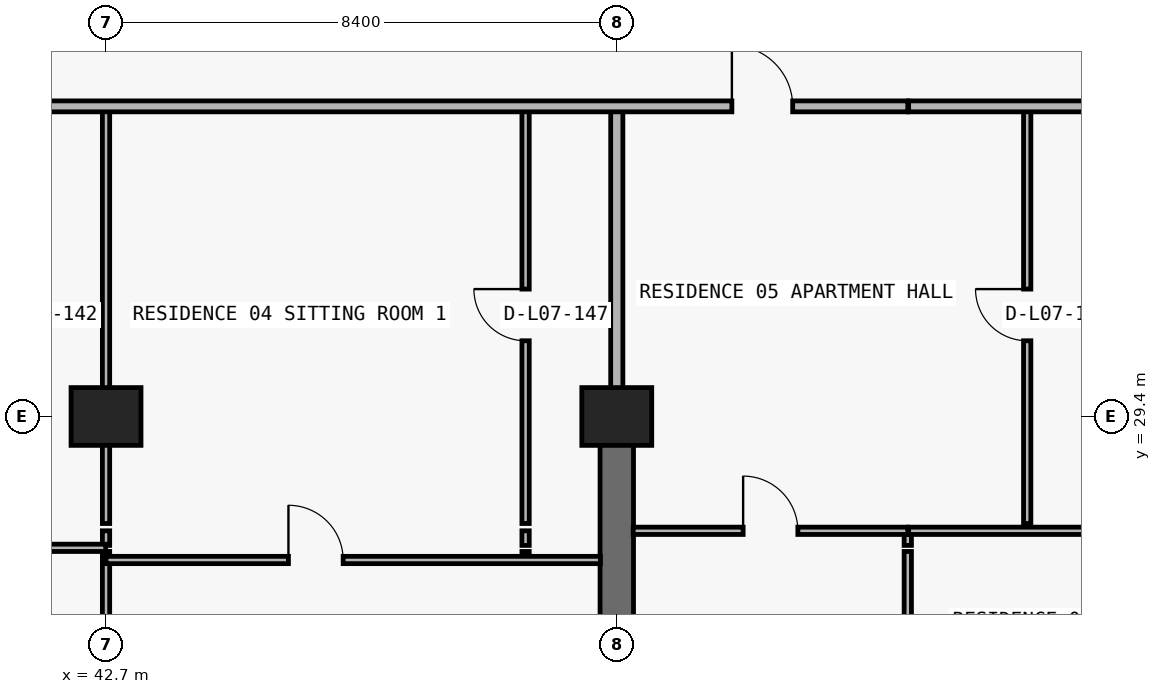
"""IFC4 building model, lengths in metres.
Left out: names, types, materials, properties, quantities, classifications, styles, units other than length and angle.
Written with IfcOpenShell. Run it as: python <this file> out.ifc"""

import sys

from ifc_helpers import new_model, si_unit, direction, frame, frame_2d, origin, origin_2d, place, context, subcontext, project, spatial, rectangle, extrude, element, fill, save


model = new_model("IFC4")
c1 = context("Model", 3, precision=1e-05, world=origin(), true_north=direction((0.0, 1.0)))
c2 = subcontext(c1, "Body", "Model", "MODEL_VIEW")
j1 = project(units=[si_unit("LENGTHUNIT", "METRE"), si_unit("PLANEANGLEUNIT", "RADIAN")], contexts=[c1])
p1 = place(None, origin())
s1 = spatial("IfcSite", under=j1, at=p1, CompositionType="ELEMENT")
p2 = place(p1, origin())
s2 = spatial("IfcBuilding", under=s1, at=p2, CompositionType="ELEMENT")
p3 = place(p2, frame((0.0, 0.0, 33.3)))
s3 = spatial("IfcBuildingStorey", under=s2, at=p3, CompositionType="ELEMENT", Elevation=33.3)
for number, where, z_axis, x_axis in (
    (1, (42.7, 29.4, 0.0), (0.0, 0.0, 1.0), (1.0, 0.0, 0.0)),
    (2, (51.1, 29.4, 0.0), (0.0, 0.0, 1.0), (1.0, 0.0, 0.0)),
):
    element("IfcColumn", number, at=place(p3, frame(where, z_axis=z_axis, x_axis=x_axis)), inside=s3, PredefinedType="COLUMN", context=c2, shape_type="SweptSolid", body=[
        extrude(rectangle(XDim=1.15, YDim=0.95, at=origin_2d()), origin(), (0.0, 0.0, 1.0), 3.05),
    ])
p4 = place(p3, frame((51.1, 20.8, 0.0), z_axis=(0.0, 0.0, 1.0), x_axis=(0.0, 1.0, 0.0)))
e3 = element("IfcWall", 3, at=p4, inside=s3, PredefinedType="SHEAR", context=c2, shape_type="SweptSolid", body=[
    extrude(rectangle(XDim=8.6, YDim=0.55, at=frame_2d((4.3, 0.0))), origin(), (0.0, 0.0, 1.0), 3.05),
])
p5 = place(p3, frame((42.7, 22.49, 0.0), z_axis=(0.0, 0.0, 1.0), x_axis=(0.0, 1.0, 0.0)))
e4 = element("IfcWall", 4, at=p5, inside=s3, PredefinedType="PARTITIONING", context=c2, shape_type="SweptSolid", body=[
    extrude(rectangle(XDim=4.69, YDim=0.12, at=frame_2d((2.345, 0.0))), origin(), (0.0, 0.0, 1.0), 2.11),
])
p6 = place(p5, frame((1.9, 0.0, 0.0)))
e5 = element("IfcOpeningElement", 5, at=p6, cuts=e4, PredefinedType="OPENING", context=c2, shape_type="SweptSolid", body=[
    extrude(rectangle(XDim=0.9, YDim=2.06, at=frame_2d((0.45, 1.03))), frame((0.0, 0.07, 0.0), z_axis=(0.0, -1.0, 0.0), x_axis=(1.0, 0.0, 0.0)), (0.0, 0.0, 1.0), 0.14),
])
p7 = place(p3, frame((42.7, 27.28, 0.0), z_axis=(0.0, 0.0, 1.0), x_axis=(0.0, 1.0, 0.0)))
e6 = element("IfcWall", 6, at=p7, inside=s3, PredefinedType="PARTITIONING", context=c2, shape_type="SweptSolid", body=[
    extrude(rectangle(XDim=0.24, YDim=0.12, at=frame_2d((0.12, 0.0))), origin(), (0.0, 0.0, 1.0), 2.11),
])
p8 = place(p3, frame((42.7, 27.64, 0.0), z_axis=(0.0, 0.0, 1.0), x_axis=(0.0, 1.0, 0.0)))
e7 = element("IfcWall", 7, at=p8, inside=s3, PredefinedType="PARTITIONING", context=c2, shape_type="SweptSolid", body=[
    extrude(rectangle(XDim=6.86, YDim=0.12, at=frame_2d((3.43, 0.0))), origin(), (0.0, 0.0, 1.0), 2.11),
])
p9 = place(p3, frame((49.6, 27.04, 0.0), z_axis=(0.0, 0.0, 1.0), x_axis=(0.0, 1.0, 0.0)))
e8 = element("IfcWall", 8, at=p9, inside=s3, PredefinedType="PARTITIONING", context=c2, shape_type="SweptSolid", body=[
    extrude(rectangle(XDim=0.14, YDim=0.12, at=frame_2d((0.07, 0.0))), origin(), (0.0, 0.0, 1.0), 3.05),
])
p10 = place(p3, frame((49.6, 27.28, 0.0), z_axis=(0.0, 0.0, 1.0), x_axis=(0.0, 1.0, 0.0)))
e9 = element("IfcWall", 9, at=p10, inside=s3, PredefinedType="PARTITIONING", context=c2, shape_type="SweptSolid", body=[
    extrude(rectangle(XDim=0.24, YDim=0.12, at=frame_2d((0.12, 0.0))), origin(), (0.0, 0.0, 1.0), 3.05),
])
p11 = place(p3, frame((49.6, 27.64, 0.0), z_axis=(0.0, 0.0, 1.0), x_axis=(0.0, 1.0, 0.0)))
e10 = element("IfcWall", 10, at=p11, inside=s3, PredefinedType="PARTITIONING", context=c2, shape_type="SweptSolid", body=[
    extrude(rectangle(XDim=6.86, YDim=0.12, at=frame_2d((3.43, 0.0))), origin(), (0.0, 0.0, 1.0), 3.05),
])
p12 = place(p11, frame((3.005, 0.0, 0.0)))
e11 = element("IfcOpeningElement", 11, at=p12, cuts=e10, PredefinedType="OPENING", context=c2, shape_type="SweptSolid", body=[
    extrude(rectangle(XDim=0.85, YDim=2.1, at=frame_2d((0.425, 1.05))), frame((0.0, 0.07, 0.0), z_axis=(0.0, -1.0, 0.0), x_axis=(1.0, 0.0, 0.0)), (0.0, 0.0, 1.0), 0.14),
])
p13 = place(p3, frame((51.1, 29.405, 0.0), z_axis=(0.0, 0.0, 1.0), x_axis=(0.0, 1.0, 0.0)))
e12 = element("IfcWall", 12, at=p13, inside=s3, PredefinedType="PARTITIONING", context=c2, shape_type="SweptSolid", body=[
    extrude(rectangle(XDim=5.095, YDim=0.2, at=frame_2d((2.547, 0.0))), origin(), (0.0, 0.0, 1.0), 2.335),
])
p14 = place(p3, frame((55.886, 22.49, 0.0), z_axis=(0.0, 0.0, 1.0), x_axis=(0.0, 1.0, 0.0)))
e13 = element("IfcWall", 13, at=p14, inside=s3, PredefinedType="PARTITIONING", context=c2, shape_type="SweptSolid", body=[
    extrude(rectangle(XDim=4.69, YDim=0.12, at=frame_2d((2.345, 0.0))), origin(), (0.0, 0.0, 1.0), 3.05),
])
p15 = place(p14, frame((1.895, 0.0, 0.0)))
e14 = element("IfcOpeningElement", 14, at=p15, cuts=e13, PredefinedType="OPENING", context=c2, shape_type="SweptSolid", body=[
    extrude(rectangle(XDim=0.9, YDim=2.15, at=frame_2d((0.45, 1.075))), frame((0.0, 0.07, 0.0), z_axis=(0.0, -1.0, 0.0), x_axis=(1.0, 0.0, 0.0)), (0.0, 0.0, 1.0), 0.14),
])
p16 = place(p3, frame((55.886, 27.28, 0.0), z_axis=(0.0, 0.0, 1.0), x_axis=(0.0, 1.0, 0.0)))
e15 = element("IfcWall", 15, at=p16, inside=s3, PredefinedType="PARTITIONING", context=c2, shape_type="SweptSolid", body=[
    extrude(rectangle(XDim=0.24, YDim=0.12, at=frame_2d((0.12, 0.0))), origin(), (0.0, 0.0, 1.0), 3.05),
])
p17 = place(p3, frame((57.85, 27.64, 0.0), z_axis=(0.0, 0.0, 1.0), x_axis=(0.0, 1.0, 0.0)))
e16 = element("IfcWall", 16, at=p17, inside=s3, PredefinedType="PARTITIONING", context=c2, shape_type="SweptSolid", body=[
    extrude(rectangle(XDim=6.86, YDim=0.12, at=frame_2d((3.43, 0.0))), origin(), (0.0, 0.0, 1.0), 3.05),
])
p18 = place(p17, frame((3.005, 0.0, 0.0)))
e17 = element("IfcOpeningElement", 17, at=p18, cuts=e16, PredefinedType="OPENING", context=c2, shape_type="SweptSolid", body=[
    extrude(rectangle(XDim=0.85, YDim=2.1, at=frame_2d((0.425, 1.05))), frame((0.0, 0.07, 0.0), z_axis=(0.0, -1.0, 0.0), x_axis=(1.0, 0.0, 0.0)), (0.0, 0.0, 1.0), 0.14),
])
p19 = place(p3, frame((42.7, 27.04, 0.0), z_axis=(0.0, 0.0, 1.0), x_axis=(1.0, 0.0, 0.0)))
e18 = element("IfcWall", 18, at=p19, inside=s3, PredefinedType="PARTITIONING", context=c2, shape_type="SweptSolid", body=[
    extrude(rectangle(XDim=8.13, YDim=0.12, at=frame_2d((4.065, 0.0))), origin(), (0.0, 0.0, 1.0), 3.05),
])
p20 = place(p19, frame((3.0, 0.0, 0.0)))
e19 = element("IfcOpeningElement", 19, at=p20, cuts=e18, PredefinedType="OPENING", context=c2, shape_type="SweptSolid", body=[
    extrude(rectangle(XDim=0.9, YDim=2.15, at=frame_2d((0.45, 1.075))), frame((0.0, 0.07, 0.0), z_axis=(0.0, -1.0, 0.0), x_axis=(1.0, 0.0, 0.0)), (0.0, 0.0, 1.0), 0.14),
])
p21 = place(p3, frame((35.1, 27.24, 0.0), z_axis=(0.0, 0.0, 1.0), x_axis=(1.0, 0.0, 0.0)))
e20 = element("IfcWall", 20, at=p21, inside=s3, PredefinedType="PARTITIONING", context=c2, shape_type="SweptSolid", body=[
    extrude(rectangle(XDim=7.595, YDim=0.12, at=frame_2d((3.797, 0.0))), origin(), (0.0, 0.0, 1.0), 3.05),
])
p22 = place(p21, frame((2.6, 0.0, 0.0)))
e21 = element("IfcOpeningElement", 21, at=p22, cuts=e20, PredefinedType="OPENING", context=c2, shape_type="SweptSolid", body=[
    extrude(rectangle(XDim=0.9, YDim=2.15, at=frame_2d((0.45, 1.075))), frame((0.0, 0.07, 0.0), z_axis=(0.0, -1.0, 0.0), x_axis=(1.0, 0.0, 0.0)), (0.0, 0.0, 1.0), 0.14),
])
p23 = place(p3, frame((51.37, 27.52, 0.0), z_axis=(0.0, 0.0, 1.0), x_axis=(1.0, 0.0, 0.0)))
e22 = element("IfcWall", 22, at=p23, inside=s3, PredefinedType="PARTITIONING", context=c2, shape_type="SweptSolid", body=[
    extrude(rectangle(XDim=4.516, YDim=0.12, at=frame_2d((2.258, 0.0))), origin(), (0.0, 0.0, 1.0), 3.05),
])
p24 = place(p23, frame((1.808, 0.0, 0.0)))
e23 = element("IfcOpeningElement", 23, at=p24, cuts=e22, PredefinedType="OPENING", context=c2, shape_type="SweptSolid", body=[
    extrude(rectangle(XDim=0.9, YDim=2.15, at=frame_2d((0.45, 1.075))), frame((0.0, 0.07, 0.0), z_axis=(0.0, -1.0, 0.0), x_axis=(1.0, 0.0, 0.0)), (0.0, 0.0, 1.0), 0.14),
])
p25 = place(p3, frame((55.9, 27.52, 0.0), z_axis=(0.0, 0.0, 1.0), x_axis=(1.0, 0.0, 0.0)))
e24 = element("IfcWall", 24, at=p25, inside=s3, PredefinedType="PARTITIONING", context=c2, shape_type="SweptSolid", body=[
    extrude(rectangle(XDim=3.6, YDim=0.12, at=frame_2d((1.8, 0.0))), origin(), (0.0, 0.0, 1.0), 3.05),
])
p26 = place(p3, frame((5.105, 34.5, 0.0), z_axis=(0.0, 0.0, 1.0), x_axis=(1.0, 0.0, 0.0)))
e25 = element("IfcWall", 25, at=p26, inside=s3, PredefinedType="PARTITIONING", context=c2, shape_type="SweptSolid", body=[
    extrude(rectangle(XDim=50.781, YDim=0.18, at=frame_2d((25.391, 0.0))), origin(), (0.0, 0.0, 1.0), 3.05),
])
p27 = place(p26, frame((7.67, 0.0, 0.0)))
e26 = element("IfcOpeningElement", 26, at=p27, cuts=e25, PredefinedType="OPENING", context=c2, shape_type="SweptSolid", body=[
    extrude(rectangle(XDim=1.0, YDim=2.2, at=frame_2d((0.5, 1.1))), frame((0.0, 0.1, 0.0), z_axis=(0.0, -1.0, 0.0), x_axis=(1.0, 0.0, 0.0)), (0.0, 0.0, 1.0), 0.2),
])
p28 = place(p26, frame((16.07, 0.0, 0.0)))
e27 = element("IfcOpeningElement", 27, at=p28, cuts=e25, PredefinedType="OPENING", context=c2, shape_type="SweptSolid", body=[
    extrude(rectangle(XDim=1.0, YDim=2.2, at=frame_2d((0.5, 1.1))), frame((0.0, 0.1, 0.0), z_axis=(0.0, -1.0, 0.0), x_axis=(1.0, 0.0, 0.0)), (0.0, 0.0, 1.0), 0.2),
])
p29 = place(p26, frame((24.47, 0.0, 0.0)))
e28 = element("IfcOpeningElement", 28, at=p29, cuts=e25, PredefinedType="OPENING", context=c2, shape_type="SweptSolid", body=[
    extrude(rectangle(XDim=1.0, YDim=2.2, at=frame_2d((0.5, 1.1))), frame((0.0, 0.1, 0.0), z_axis=(0.0, -1.0, 0.0), x_axis=(1.0, 0.0, 0.0)), (0.0, 0.0, 1.0), 0.2),
])
p30 = place(p26, frame((32.545, 0.0, 0.0)))
e29 = element("IfcOpeningElement", 29, at=p30, cuts=e25, PredefinedType="OPENING", context=c2, shape_type="SweptSolid", body=[
    extrude(rectangle(XDim=1.0, YDim=2.2, at=frame_2d((0.5, 1.1))), frame((0.0, 0.1, 0.0), z_axis=(0.0, -1.0, 0.0), x_axis=(1.0, 0.0, 0.0)), (0.0, 0.0, 1.0), 0.2),
])
p31 = place(p26, frame((47.888, 0.0, 0.0)))
e30 = element("IfcOpeningElement", 30, at=p31, cuts=e25, PredefinedType="OPENING", context=c2, shape_type="SweptSolid", body=[
    extrude(rectangle(XDim=1.0, YDim=2.2, at=frame_2d((0.5, 1.1))), frame((0.0, 0.1, 0.0), z_axis=(0.0, -1.0, 0.0), x_axis=(1.0, 0.0, 0.0)), (0.0, 0.0, 1.0), 0.2),
])
p32 = place(p3, frame((55.9, 34.5, 0.0), z_axis=(0.0, 0.0, 1.0), x_axis=(1.0, 0.0, 0.0)))
e31 = element("IfcWall", 31, at=p32, inside=s3, PredefinedType="PARTITIONING", context=c2, shape_type="SweptSolid", body=[
    extrude(rectangle(XDim=16.8, YDim=0.18, at=frame_2d((8.4, 0.0))), origin(), (0.0, 0.0, 1.0), 3.05),
])
p33 = place(p32, frame((6.475, 0.0, 0.0)))
e32 = element("IfcOpeningElement", 32, at=p33, cuts=e31, PredefinedType="OPENING", context=c2, shape_type="SweptSolid", body=[
    extrude(rectangle(XDim=1.0, YDim=2.2, at=frame_2d((0.5, 1.1))), frame((0.0, 0.1, 0.0), z_axis=(0.0, -1.0, 0.0), x_axis=(1.0, 0.0, 0.0)), (0.0, 0.0, 1.0), 0.2),
])
p34 = place(p20, origin())
e33 = element("IfcDoor", 33, at=p34, inside=s3, OperationType="SINGLE_SWING_LEFT", PredefinedType="DOOR", context=c2, shape_type="SweptSolid", body=[
    extrude(rectangle(XDim=0.9, YDim=2.15, at=frame_2d((0.45, 1.075))), frame((0.0, 0.025, 0.0), z_axis=(0.0, -1.0, 0.0), x_axis=(1.0, 0.0, 0.0)), (0.0, 0.0, 1.0), 0.05),
])
fill(e19, e33)
p35 = place(p12, origin())
e34 = element("IfcDoor", 34, at=p35, inside=s3, OperationType="SINGLE_SWING_RIGHT", PredefinedType="DOOR", context=c2, shape_type="SweptSolid", body=[
    extrude(rectangle(XDim=0.85, YDim=2.1, at=frame_2d((0.425, 1.05))), frame((0.0, 0.025, 0.0), z_axis=(0.0, -1.0, 0.0), x_axis=(1.0, 0.0, 0.0)), (0.0, 0.0, 1.0), 0.05),
])
fill(e11, e34)
p36 = place(p31, origin())
e35 = element("IfcDoor", 35, at=p36, inside=s3, OperationType="SINGLE_SWING_LEFT", PredefinedType="DOOR", context=c2, shape_type="SweptSolid", body=[
    extrude(rectangle(XDim=1.0, YDim=2.2, at=frame_2d((0.5, 1.1))), frame((0.0, 0.025, 0.0), z_axis=(0.0, -1.0, 0.0), x_axis=(1.0, 0.0, 0.0)), (0.0, 0.0, 1.0), 0.05),
])
fill(e30, e35)
p37 = place(p18, origin())
e36 = element("IfcDoor", 36, at=p37, inside=s3, OperationType="SINGLE_SWING_RIGHT", PredefinedType="DOOR", context=c2, shape_type="SweptSolid", body=[
    extrude(rectangle(XDim=0.85, YDim=2.1, at=frame_2d((0.425, 1.05))), frame((0.0, 0.025, 0.0), z_axis=(0.0, -1.0, 0.0), x_axis=(1.0, 0.0, 0.0)), (0.0, 0.0, 1.0), 0.05),
])
fill(e17, e36)
p38 = place(p24, origin())
e37 = element("IfcDoor", 37, at=p38, inside=s3, OperationType="SINGLE_SWING_LEFT", PredefinedType="DOOR", context=c2, shape_type="SweptSolid", body=[
    extrude(rectangle(XDim=0.9, YDim=2.15, at=frame_2d((0.45, 1.075))), frame((0.0, 0.025, 0.0), z_axis=(0.0, -1.0, 0.0), x_axis=(1.0, 0.0, 0.0)), (0.0, 0.0, 1.0), 0.05),
])
fill(e23, e37)
save(model, sys.argv[1])
